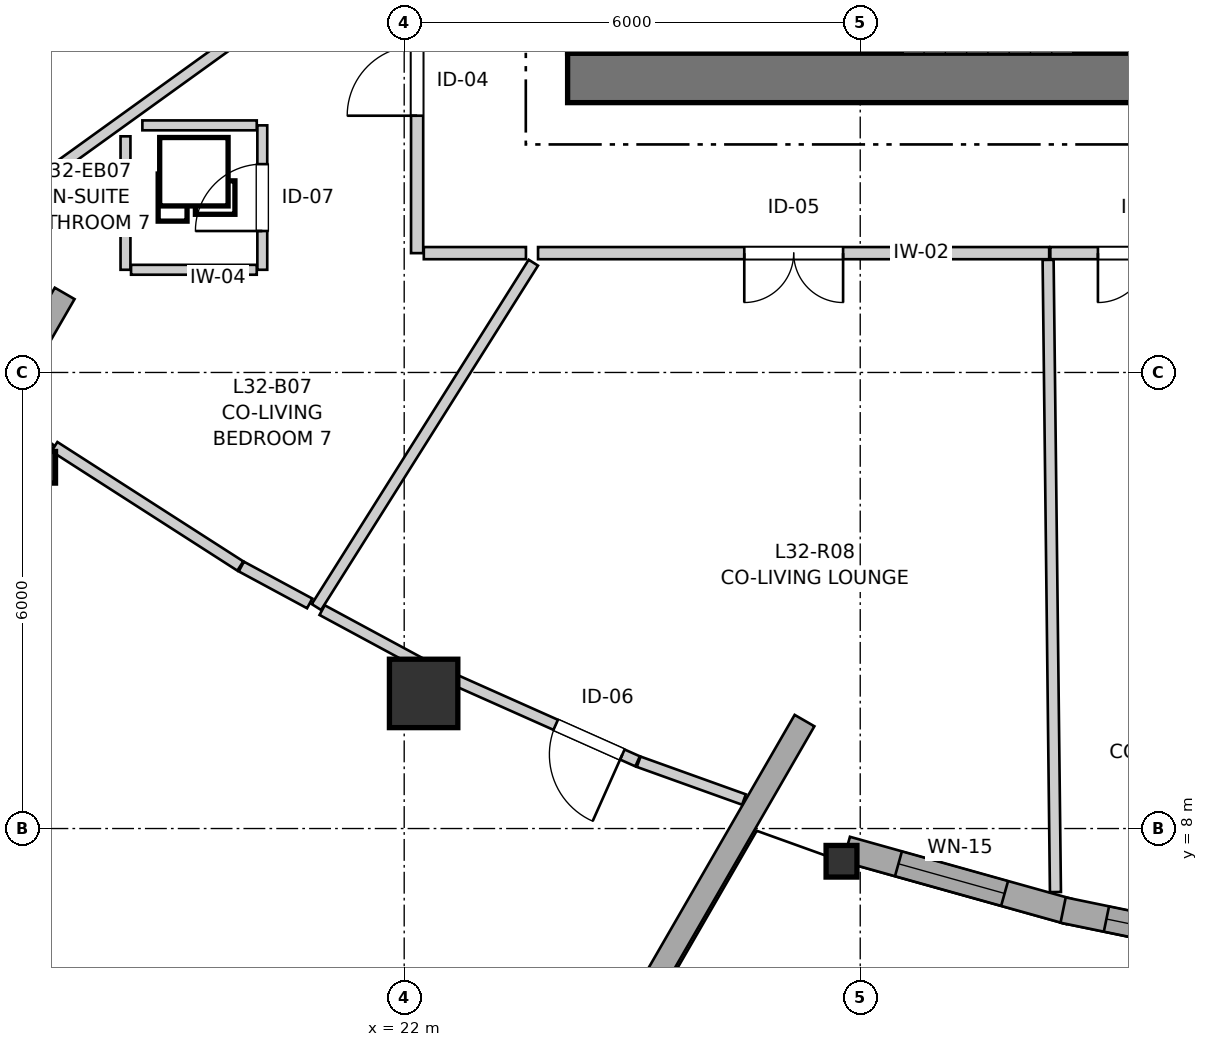
"""IFC4 building model, lengths in metres.
Left out: names, types, materials, properties, quantities, classifications, styles, units other than length and angle.
Written with IfcOpenShell. Run it as: python <this file> out.ifc"""

import sys

from ifc_helpers import new_model, si_unit, direction, frame, frame_2d, origin, origin_2d, place, context, subcontext, project, spatial, rectangle, i_section, extrude, source, transform, mapped, element, fill, save


model = new_model("IFC4")
c1 = context("Model", 3, precision=1e-05, world=origin(), true_north=direction((0.0, 1.0)))
c2 = subcontext(c1, "Body", "Model", "MODEL_VIEW")
j1 = project(units=[si_unit("LENGTHUNIT", "METRE"), si_unit("PLANEANGLEUNIT", "RADIAN")], contexts=[c1])
p1 = place(None, origin())
s1 = spatial("IfcSite", under=j1, at=p1, CompositionType="ELEMENT")
p2 = place(p1, origin())
s2 = spatial("IfcBuilding", under=s1, at=p2, CompositionType="ELEMENT")
p3 = place(p2, frame((0.0, 0.0, 108.8)))
s3 = spatial("IfcBuildingStorey", under=s2, at=p3, CompositionType="ELEMENT", Elevation=108.8)
p4 = place(p3, frame((24.15, 17.875, 0.0), z_axis=(0.0, 0.0, 1.0), x_axis=(1.0, 0.0, 0.0)))
e1 = element("IfcWall", 1, at=p4, inside=s3, PredefinedType="SHEAR", context=c2, shape_type="SweptSolid", body=[
    extrude(rectangle(XDim=12.4, YDim=0.65, at=frame_2d((6.2, 0.0))), origin(), (0.0, 0.0, 1.0), 2.935),
])
p5 = place(p3, frame((24.475, 33.8, 0.0), z_axis=(0.0, 0.0, 1.0), x_axis=(0.0, -1.0, 0.0)))
e2 = element("IfcWall", 2, at=p5, inside=s3, PredefinedType="SHEAR", context=c2, shape_type="SweptSolid", body=[
    extrude(rectangle(XDim=15.6, YDim=0.65, at=frame_2d((7.8, 0.0))), origin(), (0.0, 0.0, 1.0), 2.935),
])
p6 = place(p5, frame((7.05, 0.0, 0.0)))
e3 = element("IfcOpeningElement", 3, at=p6, cuts=e2, PredefinedType="OPENING", context=c2, shape_type="SweptSolid", body=[
    extrude(rectangle(XDim=1.5, YDim=2.15, at=frame_2d((0.75, 1.075))), frame((0.0, 0.335, 0.0), z_axis=(0.0, -1.0, 0.0), x_axis=(1.0, 0.0, 0.0)), (0.0, 0.0, 1.0), 0.67),
])
p7 = place(p5, frame((3.52, 0.0, 0.0)))
e4 = element("IfcOpeningElement", 4, at=p7, cuts=e2, PredefinedType="OPENING", context=c2, shape_type="SweptSolid", body=[
    extrude(rectangle(XDim=0.86, YDim=2.05, at=frame_2d((0.43, 1.025))), frame((0.0, 0.335, 0.0), z_axis=(0.0, -1.0, 0.0), x_axis=(1.0, 0.0, 0.0)), (0.0, 0.0, 1.0), 0.67),
])
p8 = place(p5, frame((11.22, 0.0, 0.0)))
e5 = element("IfcOpeningElement", 5, at=p8, cuts=e2, PredefinedType="OPENING", context=c2, shape_type="SweptSolid", body=[
    extrude(rectangle(XDim=0.86, YDim=2.05, at=frame_2d((0.43, 1.025))), frame((0.0, 0.335, 0.0), z_axis=(0.0, -1.0, 0.0), x_axis=(1.0, 0.0, 0.0)), (0.0, 0.0, 1.0), 0.67),
])
m1 = source(origin(), c2, "Body", "SweptSolid", [
    extrude(i_section(OverallWidth=0.406, OverallDepth=0.416, WebThickness=0.027, FlangeThickness=0.044, FilletRadius=0.015, at=origin_2d()), origin(), (0.0, 0.0, 1.0), 2.935),
])
p9 = place(p3, frame((17.209, 12.753, 0.0), z_axis=(0.0, 0.0, 1.0), x_axis=(1.0, 0.0, 0.0)))
e6 = element("IfcColumn", 6, at=p9, inside=s3, PredefinedType="PILASTER", context=c2, shape_type="MappedRepresentation", body=[
    mapped(m1, transform((0.0, 0.0, 0.0), x_axis=(1.0, 0.0, 0.0), y_axis=(0.0, 1.0, 0.0), z_axis=(0.0, 0.0, 1.0), scale=1.0)),
])
m2 = source(origin(), c2, "Body", "SweptSolid", [
    extrude(rectangle(XDim=0.9, YDim=0.9, at=origin_2d()), origin(), (0.0, 0.0, 1.0), 2.935),
])
p10 = place(p3, frame((22.256, 9.778, 0.0), z_axis=(0.0, 0.0, 1.0), x_axis=(1.0, 0.0, 0.0)))
e7 = element("IfcColumn", 7, at=p10, inside=s3, PredefinedType="COLUMN", context=c2, shape_type="MappedRepresentation", body=[
    mapped(m2, transform((0.0, 0.0, 0.0), x_axis=(1.0, 0.0, 0.0), y_axis=(0.0, 1.0, 0.0), z_axis=(0.0, 0.0, 1.0), scale=1.0)),
])
p11 = place(p3, frame((27.754, 7.569, 0.0), z_axis=(0.0, 0.0, 1.0), x_axis=(1.0, 0.0, 0.0)))
e8 = element("IfcColumn", 8, at=p11, inside=s3, PredefinedType="PILASTER", context=c2, shape_type="MappedRepresentation", body=[
    mapped(m1, transform((0.0, 0.0, 0.0), x_axis=(1.0, 0.0, 0.0), y_axis=(0.0, 1.0, 0.0), z_axis=(0.0, 0.0, 1.0), scale=1.0)),
])
p12 = place(p3, frame((14.928, 14.686, 0.0), z_axis=(0.0, 0.0, 1.0), x_axis=(0.798387010211, -0.602144651995, 0.0)))
e9 = element("IfcWall", 9, at=p12, inside=s3, PredefinedType="SOLIDWALL", context=c2, shape_type="SweptSolid", body=[
    extrude(rectangle(XDim=2.966, YDim=0.34, at=frame_2d((1.483, 0.0))), origin(), (0.0, 0.0, 1.0), 2.465),
])
p13 = place(p12, frame((0.891, 0.0, 0.82)))
e10 = element("IfcOpeningElement", 10, at=p13, cuts=e9, PredefinedType="OPENING", context=c2, shape_type="SweptSolid", body=[
    extrude(rectangle(XDim=0.58, YDim=1.35, at=frame_2d((0.29, 0.675))), frame((0.0, 0.18, 0.0), z_axis=(0.0, -1.0, 0.0), x_axis=(1.0, 0.0, 0.0)), (0.0, 0.0, 1.0), 0.36),
])
p14 = place(p3, frame((27.819, 7.728, 0.0), z_axis=(0.0, 0.0, 1.0), x_axis=(0.963032186905, -0.269386352632, 0.0)))
e11 = element("IfcWall", 11, at=p14, inside=s3, PredefinedType="SOLIDWALL", context=c2, shape_type="SweptSolid", body=[
    extrude(rectangle(XDim=3.049, YDim=0.34, at=frame_2d((1.524, 0.0))), origin(), (0.0, 0.0, 1.0), 2.465),
])
p15 = place(p14, frame((0.71, 0.0, 0.82)))
e12 = element("IfcOpeningElement", 12, at=p15, cuts=e11, PredefinedType="OPENING", context=c2, shape_type="SweptSolid", body=[
    extrude(rectangle(XDim=1.45, YDim=1.25, at=frame_2d((0.725, 0.625))), frame((0.0, 0.18, 0.0), z_axis=(0.0, -1.0, 0.0), x_axis=(1.0, 0.0, 0.0)), (0.0, 0.0, 1.0), 0.36),
])
p16 = place(p3, frame((30.67, 6.927, 0.0), z_axis=(0.0, 0.0, 1.0), x_axis=(0.979422345081, -0.201821381317, 0.0)))
e13 = element("IfcWall", 13, at=p16, inside=s3, PredefinedType="SOLIDWALL", context=c2, shape_type="SweptSolid", body=[
    extrude(rectangle(XDim=2.903, YDim=0.34, at=frame_2d((1.452, 0.0))), origin(), (0.0, 0.0, 1.0), 2.465),
])
p17 = place(p16, frame((0.582, 0.0, 0.82)))
e14 = element("IfcOpeningElement", 14, at=p17, cuts=e13, PredefinedType="OPENING", context=c2, shape_type="SweptSolid", body=[
    extrude(rectangle(XDim=1.75, YDim=1.3, at=frame_2d((0.875, 0.65))), frame((0.0, 0.18, 0.0), z_axis=(0.0, -1.0, 0.0), x_axis=(1.0, 0.0, 0.0)), (0.0, 0.0, 1.0), 0.36),
])
p18 = place(p3, frame((27.267, 9.42, 0.0), z_axis=(0.0, 0.0, 1.0), x_axis=(-0.500001212782, -0.866024703583, 0.0)))
e15 = element("IfcWall", 15, at=p18, inside=s3, PredefinedType="SOLIDWALL", context=c2, shape_type="SweptSolid", body=[
    extrude(rectangle(XDim=20.09, YDim=0.3, at=frame_2d((10.045, 0.0))), origin(), (0.0, 0.0, 1.0), 2.115),
])
p19 = place(p3, frame((17.533, 15.04, 0.0), z_axis=(0.0, 0.0, 1.0), x_axis=(-0.499995950774, -0.866027741594, 0.0)))
e16 = element("IfcWall", 16, at=p19, inside=s3, PredefinedType="SOLIDWALL", context=c2, shape_type="SweptSolid", body=[
    extrude(rectangle(XDim=20.091, YDim=0.3, at=frame_2d((10.045, 0.0))), origin(), (0.0, 0.0, 1.0), 2.115),
])
p20 = place(p3, frame((30.486, 15.57, 0.0), z_axis=(0.0, 0.0, 1.0), x_axis=(-1.0, 0.0, 0.0)))
e17 = element("IfcWall", 17, at=p20, inside=s3, PredefinedType="PARTITIONING", context=c2, shape_type="SweptSolid", body=[
    extrude(rectangle(XDim=6.725, YDim=0.16, at=frame_2d((3.363, 0.0))), origin(), (0.0, 0.0, 1.0), 2.935),
])
p21 = place(p20, frame((2.711, 0.0, 0.0)))
e18 = element("IfcOpeningElement", 18, at=p21, cuts=e17, PredefinedType="OPENING", context=c2, shape_type="SweptSolid", body=[
    extrude(rectangle(XDim=1.3, YDim=2.1, at=frame_2d((0.65, 1.05))), frame((0.0, 0.09, 0.0), z_axis=(0.0, -1.0, 0.0), x_axis=(1.0, 0.0, 0.0)), (0.0, 0.0, 1.0), 0.18),
])
p22 = place(p3, frame((22.17, 15.57, 0.0), z_axis=(0.0, 0.0, 1.0), x_axis=(0.0, 1.0, 0.0)))
e19 = element("IfcWall", 19, at=p22, inside=s3, PredefinedType="PARTITIONING", context=c2, shape_type="SweptSolid", body=[
    extrude(rectangle(XDim=4.555, YDim=0.16, at=frame_2d((2.277, 0.0))), origin(), (0.0, 0.0, 1.0), 2.935),
])
p23 = place(p22, frame((1.808, 0.0, 0.0)))
e20 = element("IfcOpeningElement", 20, at=p23, cuts=e19, PredefinedType="OPENING", context=c2, shape_type="SweptSolid", body=[
    extrude(rectangle(XDim=0.92, YDim=2.1, at=frame_2d((0.46, 1.05))), frame((0.0, 0.09, 0.0), z_axis=(0.0, -1.0, 0.0), x_axis=(1.0, 0.0, 0.0)), (0.0, 0.0, 1.0), 0.18),
])
p24 = place(p3, frame((25.071, 8.884, 0.0), z_axis=(0.0, 0.0, 1.0), x_axis=(-0.913404708383, 0.407052623997, 0.0)))
e21 = element("IfcWall", 21, at=p24, inside=s3, PredefinedType="PARTITIONING", context=c2, shape_type="SweptSolid", body=[
    extrude(rectangle(XDim=2.923, YDim=0.145, at=frame_2d((1.462, 0.0))), origin(), (0.0, 0.0, 1.0), 2.453),
])
p25 = place(p24, frame((0.22, 0.0, 0.0)))
e22 = element("IfcOpeningElement", 22, at=p25, cuts=e21, PredefinedType="OPENING", context=c2, shape_type="SweptSolid", body=[
    extrude(rectangle(XDim=0.96, YDim=2.1, at=frame_2d((0.48, 1.05))), frame((0.0, 0.083, 0.0), z_axis=(0.0, -1.0, 0.0), x_axis=(1.0, 0.0, 0.0)), (0.0, 0.0, 1.0), 0.165),
])
p26 = place(p3, frame((33.099, 15.57, 0.0), z_axis=(0.0, 0.0, 1.0), x_axis=(-1.0, 0.0, 0.0)))
e23 = element("IfcWall", 23, at=p26, inside=s3, PredefinedType="PARTITIONING", context=c2, shape_type="SweptSolid", body=[
    extrude(rectangle(XDim=2.598, YDim=0.16, at=frame_2d((1.299, 0.0))), origin(), (0.0, 0.0, 1.0), 2.935),
])
p27 = place(p26, frame((0.671, 0.0, 0.0)))
e24 = element("IfcOpeningElement", 24, at=p27, cuts=e23, PredefinedType="OPENING", context=c2, shape_type="SweptSolid", body=[
    extrude(rectangle(XDim=1.3, YDim=2.1, at=frame_2d((0.65, 1.05))), frame((0.0, 0.09, 0.0), z_axis=(0.0, -1.0, 0.0), x_axis=(1.0, 0.0, 0.0)), (0.0, 0.0, 1.0), 0.18),
])
p28 = place(p3, frame((20.133, 15.351, 0.0), z_axis=(0.0, 0.0, 1.0), x_axis=(0.0, 1.0, 0.0)))
e25 = element("IfcWall", 25, at=p28, inside=s3, PredefinedType="PARTITIONING", context=c2, shape_type="SweptSolid", body=[
    extrude(rectangle(XDim=1.9, YDim=0.13, at=frame_2d((0.95, 0.0))), origin(), (0.0, 0.0, 1.0), 2.935),
])
p29 = place(p28, frame((0.51, 0.0, 0.0)))
e26 = element("IfcOpeningElement", 26, at=p29, cuts=e25, PredefinedType="OPENING", context=c2, shape_type="SweptSolid", body=[
    extrude(rectangle(XDim=0.88, YDim=2.05, at=frame_2d((0.44, 1.025))), frame((0.0, 0.075, 0.0), z_axis=(0.0, -1.0, 0.0), x_axis=(1.0, 0.0, 0.0)), (0.0, 0.0, 1.0), 0.15),
])
p30 = place(p3, frame((14.966, 14.915, 0.0), z_axis=(0.0, 0.0, 1.0), x_axis=(0.811310715309, 0.584615192434, 0.0)))
e27 = element("IfcWall", 27, at=p30, inside=s3, PredefinedType="PARTITIONING", context=c2, shape_type="SweptSolid", body=[
    extrude(rectangle(XDim=8.72, YDim=0.145, at=frame_2d((4.36, 0.0))), origin(), (0.0, 0.0, 1.0), 2.103),
])
p31 = place(p3, frame((30.472, 15.481, 0.0), z_axis=(0.0, 0.0, 1.0), x_axis=(0.011623708307, -0.999932442421, 0.0)))
e28 = element("IfcWall", 28, at=p31, inside=s3, PredefinedType="PARTITIONING", context=c2, shape_type="SweptSolid", body=[
    extrude(rectangle(XDim=8.317, YDim=0.145, at=frame_2d((4.159, 0.0))), origin(), (0.0, 0.0, 1.0), 2.935),
])
p32 = place(p3, frame((20.845, 10.914, 0.0), z_axis=(0.0, 0.0, 1.0), x_axis=(0.533007953382, 0.846110230189, 0.0)))
e29 = element("IfcWall", 29, at=p32, inside=s3, PredefinedType="PARTITIONING", context=c2, shape_type="SweptSolid", body=[
    extrude(rectangle(XDim=5.354, YDim=0.145, at=frame_2d((2.677, 0.0))), origin(), (0.0, 0.0, 1.0), 2.935),
])
p33 = place(p3, frame((17.398, 13.024, 0.0), z_axis=(0.0, 0.0, 1.0), x_axis=(0.841590343852, -0.540116369994, 0.0)))
e30 = element("IfcWall", 30, at=p33, inside=s3, PredefinedType="PARTITIONING", context=c2, shape_type="SweptSolid", body=[
    extrude(rectangle(XDim=2.906, YDim=0.145, at=frame_2d((1.453, 0.0))), origin(), (0.0, 0.0, 1.0), 2.453),
])
p34 = place(p3, frame((18.333, 15.351, 0.0), z_axis=(0.0, 0.0, 1.0), x_axis=(0.0, 1.0, 0.0)))
e31 = element("IfcWall", 31, at=p34, inside=s3, PredefinedType="PARTITIONING", context=c2, shape_type="SweptSolid", body=[
    extrude(rectangle(XDim=1.756, YDim=0.13, at=frame_2d((0.878, 0.0))), origin(), (0.0, 0.0, 1.0), 2.935),
])
p35 = place(p3, frame((18.555, 17.251, 0.0), z_axis=(0.0, 0.0, 1.0), x_axis=(1.0, 0.0, 0.0)))
e32 = element("IfcWall", 32, at=p35, inside=s3, PredefinedType="PARTITIONING", context=c2, shape_type="SweptSolid", body=[
    extrude(rectangle(XDim=1.505, YDim=0.13, at=frame_2d((0.752, 0.0))), origin(), (0.0, 0.0, 1.0), 2.935),
])
p36 = place(p3, frame((18.406, 15.351, 0.0), z_axis=(0.0, 0.0, 1.0), x_axis=(1.0, 0.0, 0.0)))
e33 = element("IfcWall", 33, at=p36, inside=s3, PredefinedType="PARTITIONING", context=c2, shape_type="SweptSolid", body=[
    extrude(rectangle(XDim=1.654, YDim=0.13, at=frame_2d((0.827, 0.0))), origin(), (0.0, 0.0, 1.0), 2.935),
])
p37 = place(p3, frame((20.92, 10.873, 0.0), z_axis=(0.0, 0.0, 1.0), x_axis=(0.879929881444, -0.475103571595, 0.0)))
e34 = element("IfcWall", 34, at=p37, inside=s3, PredefinedType="PARTITIONING", context=c2, shape_type="SweptSolid", body=[
    extrude(rectangle(XDim=1.667, YDim=0.145, at=frame_2d((0.834, 0.0))), origin(), (0.0, 0.0, 1.0), 2.453),
])
p38 = place(p3, frame((22.258, 15.57, 0.0), z_axis=(0.0, 0.0, 1.0), x_axis=(1.0, 0.0, 0.0)))
e35 = element("IfcWall", 35, at=p38, inside=s3, PredefinedType="PARTITIONING", context=c2, shape_type="SweptSolid", body=[
    extrude(rectangle(XDim=1.344, YDim=0.16, at=frame_2d((0.672, 0.0))), origin(), (0.0, 0.0, 1.0), 2.935),
])
p39 = place(p3, frame((25.085, 8.879, 0.0), z_axis=(0.0, 0.0, 1.0), x_axis=(0.941166260093, -0.337943887151, 0.0)))
e36 = element("IfcWall", 36, at=p39, inside=s3, PredefinedType="PARTITIONING", context=c2, shape_type="SweptSolid", body=[
    extrude(rectangle(XDim=1.472, YDim=0.145, at=frame_2d((0.736, 0.0))), origin(), (0.0, 0.0, 1.0), 2.453),
])
p40 = place(p3, frame((19.857, 11.447, 0.0), z_axis=(0.0, 0.0, 1.0), x_axis=(0.8800411893, -0.474897362738, 0.0)))
e37 = element("IfcWall", 37, at=p40, inside=s3, PredefinedType="PARTITIONING", context=c2, shape_type="SweptSolid", body=[
    extrude(rectangle(XDim=1.022, YDim=0.145, at=frame_2d((0.511, 0.0))), origin(), (0.0, 0.0, 1.0), 2.453),
])
m3 = source(origin(), c2, "Body", "SweptSolid", [
    extrude(rectangle(XDim=1.45, YDim=1.25, at=frame_2d((0.725, 0.625))), frame((0.0, 0.03, 0.0), z_axis=(0.0, -1.0, 0.0), x_axis=(1.0, 0.0, 0.0)), (0.0, 0.0, 1.0), 0.06),
])
p41 = place(p15, origin())
e38 = element("IfcWindow", 38, at=p41, inside=s3, PartitioningType="SINGLE_PANEL", PredefinedType="WINDOW", context=c2, shape_type="MappedRepresentation", body=[
    mapped(m3, transform((0.0, 0.0, 0.0), x_axis=(1.0, 0.0, 0.0), y_axis=(0.0, 1.0, 0.0), z_axis=(0.0, 0.0, 1.0), scale=1.0)),
])
fill(e12, e38)
m4 = source(origin(), c2, "Body", "SweptSolid", [
    extrude(rectangle(XDim=1.75, YDim=1.3, at=frame_2d((0.875, 0.65))), frame((0.0, 0.03, 0.0), z_axis=(0.0, -1.0, 0.0), x_axis=(1.0, 0.0, 0.0)), (0.0, 0.0, 1.0), 0.06),
])
p42 = place(p17, origin())
e39 = element("IfcWindow", 39, at=p42, inside=s3, PartitioningType="SINGLE_PANEL", PredefinedType="WINDOW", context=c2, shape_type="MappedRepresentation", body=[
    mapped(m4, transform((0.0, 0.0, 0.0), x_axis=(1.0, 0.0, 0.0), y_axis=(0.0, 1.0, 0.0), z_axis=(0.0, 0.0, 1.0), scale=1.0)),
])
fill(e14, e39)
m5 = source(origin(), c2, "Body", "SweptSolid", [
    extrude(rectangle(XDim=1.3, YDim=2.1, at=frame_2d((0.65, 1.05))), frame((0.0, 0.025, 0.0), z_axis=(0.0, -1.0, 0.0), x_axis=(1.0, 0.0, 0.0)), (0.0, 0.0, 1.0), 0.05),
])
p43 = place(p21, origin())
e40 = element("IfcDoor", 40, at=p43, inside=s3, OperationType="DOUBLE_DOOR_SINGLE_SWING", PredefinedType="DOOR", context=c2, shape_type="MappedRepresentation", body=[
    mapped(m5, transform((0.0, 0.0, 0.0), x_axis=(1.0, 0.0, 0.0), y_axis=(0.0, 1.0, 0.0), z_axis=(0.0, 0.0, 1.0), scale=1.0)),
])
fill(e18, e40)
m6 = source(origin(), c2, "Body", "SweptSolid", [
    extrude(rectangle(XDim=0.92, YDim=2.1, at=frame_2d((0.46, 1.05))), frame((0.0, 0.025, 0.0), z_axis=(0.0, -1.0, 0.0), x_axis=(1.0, 0.0, 0.0)), (0.0, 0.0, 1.0), 0.05),
])
p44 = place(p23, origin())
e41 = element("IfcDoor", 41, at=p44, inside=s3, OperationType="SINGLE_SWING_LEFT", PredefinedType="DOOR", context=c2, shape_type="MappedRepresentation", body=[
    mapped(m6, transform((0.0, 0.0, 0.0), x_axis=(1.0, 0.0, 0.0), y_axis=(0.0, 1.0, 0.0), z_axis=(0.0, 0.0, 1.0), scale=1.0)),
])
fill(e20, e41)
m7 = source(origin(), c2, "Body", "SweptSolid", [
    extrude(rectangle(XDim=0.96, YDim=2.1, at=frame_2d((0.48, 1.05))), frame((0.0, 0.025, 0.0), z_axis=(0.0, -1.0, 0.0), x_axis=(1.0, 0.0, 0.0)), (0.0, 0.0, 1.0), 0.05),
])
p45 = place(p25, origin())
e42 = element("IfcDoor", 42, at=p45, inside=s3, OperationType="SINGLE_SWING_LEFT", PredefinedType="DOOR", context=c2, shape_type="MappedRepresentation", body=[
    mapped(m7, transform((0.0, 0.0, 0.0), x_axis=(1.0, 0.0, 0.0), y_axis=(0.0, 1.0, 0.0), z_axis=(0.0, 0.0, 1.0), scale=1.0)),
])
fill(e22, e42)
p46 = place(p27, origin())
e43 = element("IfcDoor", 43, at=p46, inside=s3, OperationType="DOUBLE_DOOR_SINGLE_SWING", PredefinedType="DOOR", context=c2, shape_type="MappedRepresentation", body=[
    mapped(m5, transform((0.0, 0.0, 0.0), x_axis=(1.0, 0.0, 0.0), y_axis=(0.0, 1.0, 0.0), z_axis=(0.0, 0.0, 1.0), scale=1.0)),
])
fill(e24, e43)
m8 = source(origin(), c2, "Body", "SweptSolid", [
    extrude(rectangle(XDim=0.88, YDim=2.05, at=frame_2d((0.44, 1.025))), frame((0.0, 0.025, 0.0), z_axis=(0.0, -1.0, 0.0), x_axis=(1.0, 0.0, 0.0)), (0.0, 0.0, 1.0), 0.05),
])
p47 = place(p29, origin())
e44 = element("IfcDoor", 44, at=p47, inside=s3, OperationType="SINGLE_SWING_LEFT", PredefinedType="DOOR", context=c2, shape_type="MappedRepresentation", body=[
    mapped(m8, transform((0.0, 0.0, 0.0), x_axis=(1.0, 0.0, 0.0), y_axis=(0.0, 1.0, 0.0), z_axis=(0.0, 0.0, 1.0), scale=1.0)),
])
fill(e26, e44)
save(model, sys.argv[1])
